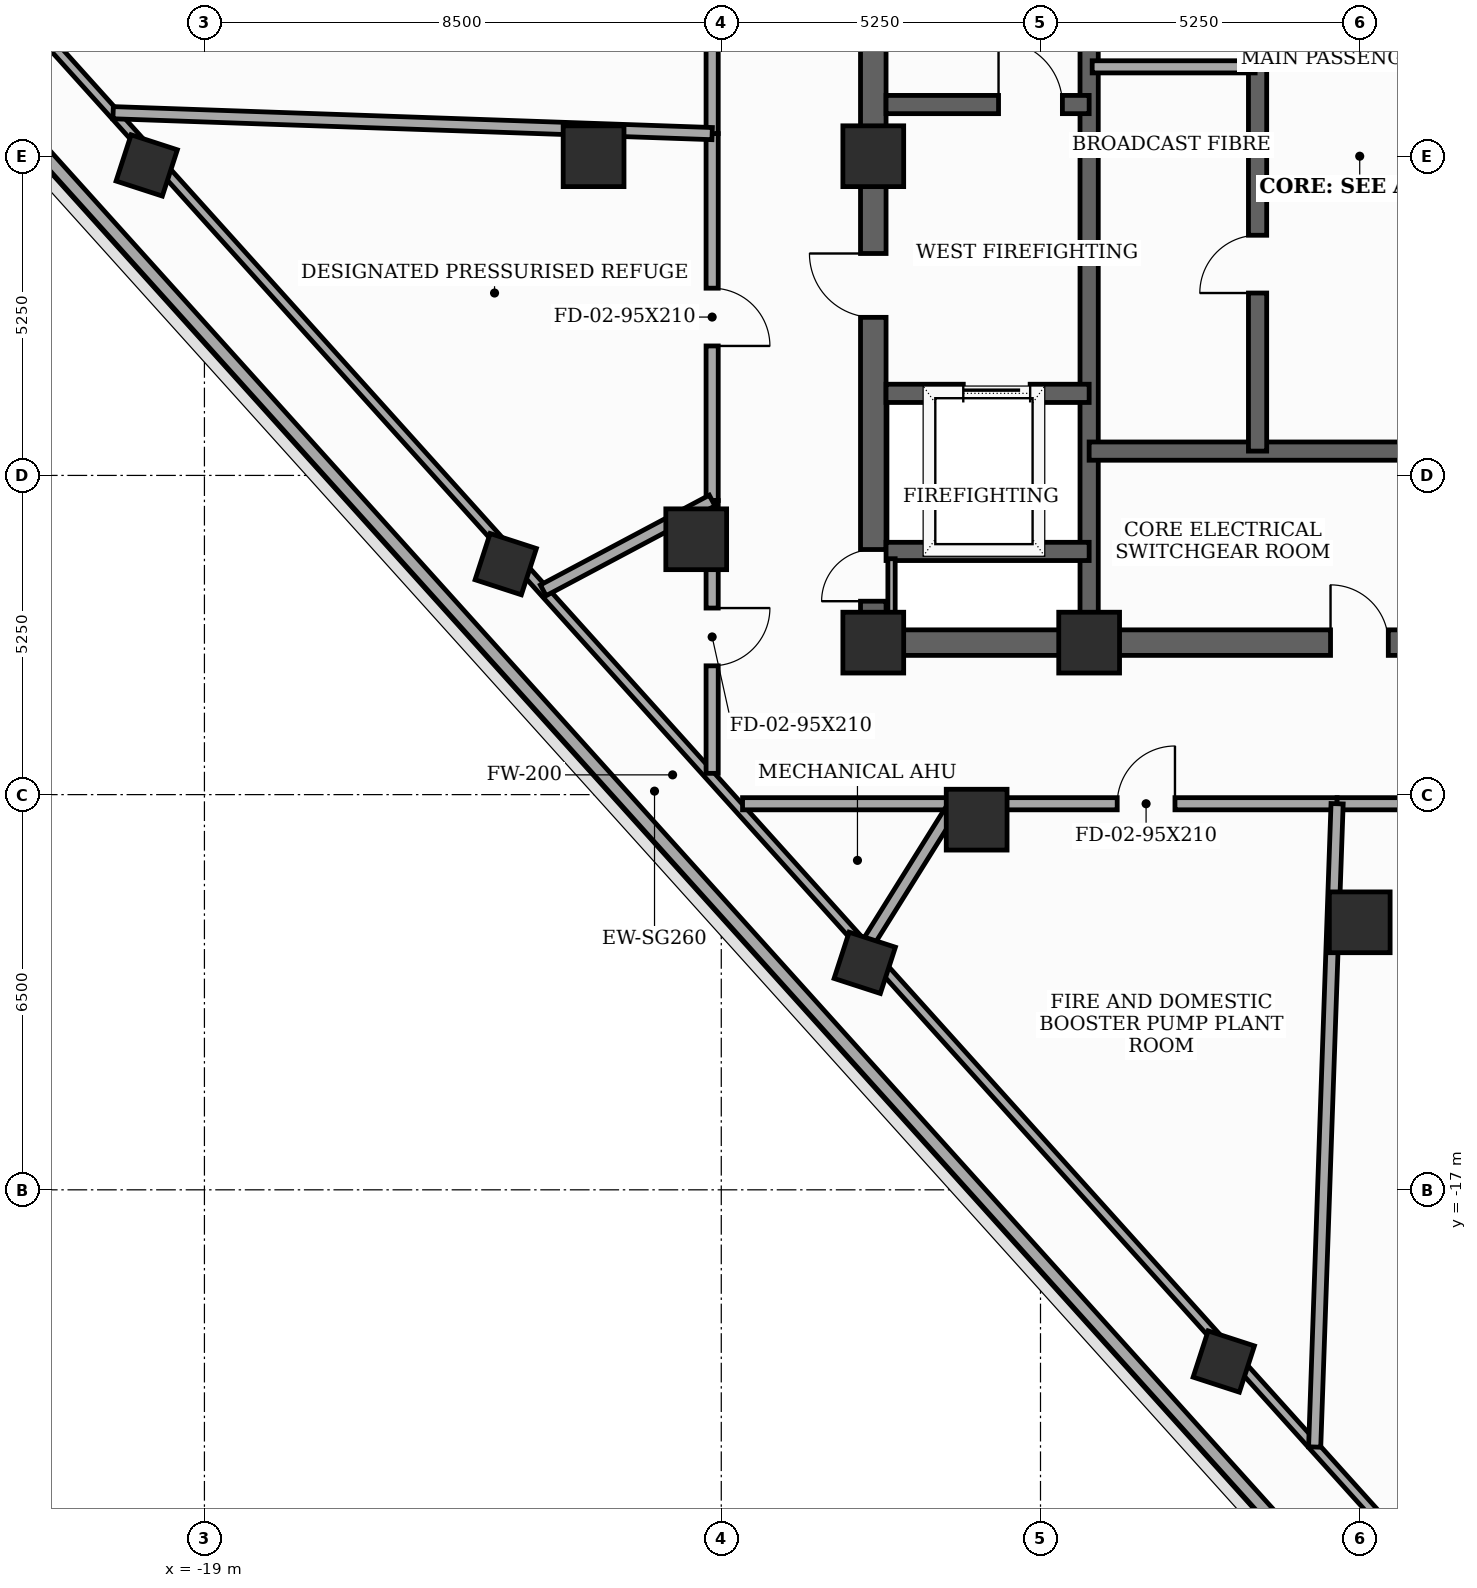
"""IFC4 building model, lengths in metres.
Left out: names, types, materials, properties, quantities, classifications, styles, units other than length and angle.
Written with IfcOpenShell. Run it as: python <this file> out.ifc"""

import sys

from ifc_helpers import new_model, si_unit, direction, frame, frame_2d, origin, origin_2d, place, context, subcontext, project, spatial, rectangle, extrude, element, fill, save


model = new_model("IFC4")
c1 = context("Model", 3, precision=1e-05, world=origin(), true_north=direction((0.0, 1.0)))
c2 = subcontext(c1, "Body", "Model", "MODEL_VIEW")
j1 = project(units=[si_unit("LENGTHUNIT", "METRE"), si_unit("PLANEANGLEUNIT", "RADIAN")], contexts=[c1])
p1 = place(None, origin())
s1 = spatial("IfcSite", under=j1, at=p1, CompositionType="ELEMENT")
p2 = place(p1, origin())
s2 = spatial("IfcBuilding", under=s1, at=p2, CompositionType="ELEMENT")
p3 = place(p2, frame((0.0, 0.0, 278.1)))
s3 = spatial("IfcBuildingStorey", under=s2, at=p3, CompositionType="ELEMENT", Elevation=278.1)
for number, where, z_axis, x_axis in (
    (1, (-8.0, -8.0, 0.0), (0.0, 0.0, 1.0), (1.0, 0.0, 0.0)),
    (2, (-4.45, -8.0, 0.0), (0.0, 0.0, 1.0), (1.0, 0.0, 0.0)),
    (3, (-8.0, 0.0, 0.0), (0.0, 0.0, 1.0), (1.0, 0.0, 0.0)),
    (4, (-12.6, 0.0, 0.0), (0.0, 0.0, 1.0), (1.0, 0.0, 0.0)),
    (5, (-10.912, -6.3, 0.0), (0.0, 0.0, 1.0), (1.0, 0.0, 0.0)),
    (6, (-6.3, -10.912, 0.0), (0.0, 0.0, 1.0), (1.0, 0.0, 0.0)),
    (7, (0.0, -12.6, 0.0), (0.0, 0.0, 1.0), (1.0, 0.0, 0.0)),
):
    element("IfcColumn", number, at=place(p3, frame(where, z_axis=z_axis, x_axis=x_axis)), inside=s3, PredefinedType="COLUMN", context=c2, shape_type="SweptSolid", body=[
        extrude(rectangle(XDim=1.0, YDim=1.0, at=origin_2d()), origin(), (0.0, 0.0, 1.0), 5.1),
    ])
for number, where, z_axis, x_axis in (
    (8, (-19.949, -0.151, 0.0), (0.0, 0.0, 1.0), (0.309, 0.951, 0.0)),
    (9, (-14.045, -6.709, 0.0), (0.0, 0.0, 1.0), (0.309, 0.951, 0.0)),
    (10, (-8.14, -13.266, 0.0), (0.0, 0.0, 1.0), (0.309, 0.951, 0.0)),
    (11, (-2.236, -19.824, 0.0), (0.0, 0.0, 1.0), (0.309, 0.951, 0.0)),
):
    element("IfcColumn", number, at=place(p3, frame(where, z_axis=z_axis, x_axis=x_axis)), inside=s3, PredefinedType="COLUMN", context=c2, shape_type="SweptSolid", body=[
        extrude(rectangle(XDim=0.8, YDim=0.8, at=origin_2d()), origin(), (0.0, 0.0, 1.0), 5.1),
    ])
p4 = place(p3, frame((-26.693, 5.65, 0.0), z_axis=(0.0, 0.0, 1.0), x_axis=(0.669131945078, -0.743143620087, 0.0)))
e12 = element("IfcWall", 12, at=p4, inside=s3, PredefinedType="SOLIDWALL", context=c2, shape_type="SweptSolid", body=[
    extrude(rectangle(XDim=44.12, YDim=0.22, at=frame_2d((22.06, 0.0))), origin(), (0.0, 0.0, 1.0), 4.4),
])
p5 = place(p3, frame((-8.0, -8.0, 0.0), z_axis=(0.0, 0.0, 1.0), x_axis=(0.0, 1.0, 0.0)))
e13 = element("IfcWall", 13, at=p5, inside=s3, PredefinedType="SHEAR", context=c2, shape_type="SweptSolid", body=[
    extrude(rectangle(XDim=16.0, YDim=0.42, at=frame_2d((8.0, 0.0))), origin(), (0.0, 0.0, 1.0), 4.9),
])
p6 = place(p5, frame((0.681, 0.0, 0.0)))
e14 = element("IfcOpeningElement", 14, at=p6, cuts=e13, PredefinedType="OPENING", context=c2, shape_type="SweptSolid", body=[
    extrude(rectangle(XDim=0.85, YDim=2.02, at=frame_2d((0.425, 1.01))), frame((0.0, 0.22, 0.0), z_axis=(0.0, -1.0, 0.0), x_axis=(1.0, 0.0, 0.0)), (0.0, 0.0, 1.0), 0.44),
])
p7 = place(p5, frame((5.35, 0.0, 0.0)))
e15 = element("IfcOpeningElement", 15, at=p7, cuts=e13, PredefinedType="OPENING", context=c2, shape_type="SweptSolid", body=[
    extrude(rectangle(XDim=1.05, YDim=2.15, at=frame_2d((0.525, 1.075))), frame((0.0, 0.22, 0.0), z_axis=(0.0, -1.0, 0.0), x_axis=(1.0, 0.0, 0.0)), (0.0, 0.0, 1.0), 0.44),
])
p8 = place(p3, frame((-8.0, -8.0, 0.0), z_axis=(0.0, 0.0, 1.0), x_axis=(1.0, 0.0, 0.0)))
e16 = element("IfcWall", 16, at=p8, inside=s3, PredefinedType="SHEAR", context=c2, shape_type="SweptSolid", body=[
    extrude(rectangle(XDim=16.0, YDim=0.42, at=frame_2d((8.0, 0.0))), origin(), (0.0, 0.0, 1.0), 4.9),
])
p9 = place(p8, frame((7.52, 0.0, 0.0)))
e17 = element("IfcOpeningElement", 17, at=p9, cuts=e16, PredefinedType="OPENING", context=c2, shape_type="SweptSolid", body=[
    extrude(rectangle(XDim=0.95, YDim=2.1, at=frame_2d((0.475, 1.05))), frame((0.0, 0.22, 0.0), z_axis=(0.0, -1.0, 0.0), x_axis=(1.0, 0.0, 0.0)), (0.0, 0.0, 1.0), 0.44),
])
p10 = place(p3, frame((-4.45, -7.79, 0.0), z_axis=(0.0, 0.0, 1.0), x_axis=(0.0, 1.0, 0.0)))
e18 = element("IfcWall", 18, at=p10, inside=s3, PredefinedType="SHEAR", context=c2, shape_type="SweptSolid", body=[
    extrude(rectangle(XDim=15.58, YDim=0.3, at=frame_2d((7.79, 0.0))), origin(), (0.0, 0.0, 1.0), 4.9),
])
p11 = place(p3, frame((-7.79, 0.85, 0.0), z_axis=(0.0, 0.0, 1.0), x_axis=(1.0, 0.0, 0.0)))
e19 = element("IfcWall", 19, at=p11, inside=s3, PredefinedType="SHEAR", context=c2, shape_type="SweptSolid", body=[
    extrude(rectangle(XDim=3.34, YDim=0.3, at=frame_2d((1.67, 0.0))), origin(), (0.0, 0.0, 1.0), 4.9),
])
p12 = place(p11, frame((1.85, 0.0, 0.0)))
e20 = element("IfcOpeningElement", 20, at=p12, cuts=e19, PredefinedType="OPENING", context=c2, shape_type="SweptSolid", body=[
    extrude(rectangle(XDim=1.05, YDim=2.15, at=frame_2d((0.525, 1.075))), frame((0.0, 0.16, 0.0), z_axis=(0.0, -1.0, 0.0), x_axis=(1.0, 0.0, 0.0)), (0.0, 0.0, 1.0), 0.32),
])
p13 = place(p3, frame((-7.79, -3.9, 0.0), z_axis=(0.0, 0.0, 1.0), x_axis=(1.0, 0.0, 0.0)))
e21 = element("IfcWall", 21, at=p13, inside=s3, PredefinedType="SHEAR", context=c2, shape_type="SweptSolid", body=[
    extrude(rectangle(XDim=3.34, YDim=0.3, at=frame_2d((1.67, 0.0))), origin(), (0.0, 0.0, 1.0), 4.9),
])
p14 = place(p13, frame((1.27, 0.0, 0.0)))
e22 = element("IfcOpeningElement", 22, at=p14, cuts=e21, PredefinedType="OPENING", context=c2, shape_type="SweptSolid", body=[
    extrude(rectangle(XDim=1.1, YDim=2.1, at=frame_2d((0.55, 1.05))), frame((0.0, 0.16, 0.0), z_axis=(0.0, -1.0, 0.0), x_axis=(1.0, 0.0, 0.0)), (0.0, 0.0, 1.0), 0.32),
])
p15 = place(p3, frame((-7.79, -6.5, 0.0), z_axis=(0.0, 0.0, 1.0), x_axis=(1.0, 0.0, 0.0)))
e23 = element("IfcWall", 23, at=p15, inside=s3, PredefinedType="SHEAR", context=c2, shape_type="SweptSolid", body=[
    extrude(rectangle(XDim=3.34, YDim=0.3, at=frame_2d((1.67, 0.0))), origin(), (0.0, 0.0, 1.0), 4.9),
])
p16 = place(p3, frame((-4.45, -4.85, 0.0), z_axis=(0.0, 0.0, 1.0), x_axis=(1.0, 0.0, 0.0)))
e24 = element("IfcWall", 24, at=p16, inside=s3, PredefinedType="SHEAR", context=c2, shape_type="SweptSolid", body=[
    extrude(rectangle(XDim=8.9, YDim=0.3, at=frame_2d((4.45, 0.0))), origin(), (0.0, 0.0, 1.0), 4.9),
])
p17 = place(p3, frame((-1.68, -4.85, 0.0), z_axis=(0.0, 0.0, 1.0), x_axis=(0.0, 1.0, 0.0)))
e25 = element("IfcWall", 25, at=p17, inside=s3, PredefinedType="SHEAR", context=c2, shape_type="SweptSolid", body=[
    extrude(rectangle(XDim=12.64, YDim=0.3, at=frame_2d((6.32, 0.0))), origin(), (0.0, 0.0, 1.0), 4.9),
])
p18 = place(p17, frame((2.6, 0.0, 0.0)))
e26 = element("IfcOpeningElement", 26, at=p18, cuts=e25, PredefinedType="OPENING", context=c2, shape_type="SweptSolid", body=[
    extrude(rectangle(XDim=0.95, YDim=2.1, at=frame_2d((0.475, 1.05))), frame((0.0, 0.16, 0.0), z_axis=(0.0, -1.0, 0.0), x_axis=(1.0, 0.0, 0.0)), (0.0, 0.0, 1.0), 0.32),
])
p19 = place(p17, frame((8.8, 0.0, 0.0)))
e27 = element("IfcOpeningElement", 27, at=p19, cuts=e25, PredefinedType="OPENING", context=c2, shape_type="SweptSolid", body=[
    extrude(rectangle(XDim=0.95, YDim=2.1, at=frame_2d((0.475, 1.05))), frame((0.0, 0.16, 0.0), z_axis=(0.0, -1.0, 0.0), x_axis=(1.0, 0.0, 0.0)), (0.0, 0.0, 1.0), 0.32),
])
p20 = place(p3, frame((-4.4, 1.47, 0.0), z_axis=(0.0, 0.0, 1.0), x_axis=(1.0, 0.0, 0.0)))
e28 = element("IfcWall", 28, at=p20, inside=s3, PredefinedType="SOLIDWALL", context=c2, shape_type="SweptSolid", body=[
    extrude(rectangle(XDim=2.68, YDim=0.2, at=frame_2d((1.34, 0.0))), origin(), (0.0, 0.0, 1.0), 4.9),
])
p21 = place(p3, frame((3.67, -26.129, 0.0), z_axis=(0.0, 0.0, 1.0), x_axis=(-0.669133990093, 0.743141778735, 0.0)))
e29 = element("IfcWall", 29, at=p21, inside=s3, PredefinedType="SOLIDWALL", context=c2, shape_type="SweptSolid", body=[
    extrude(rectangle(XDim=43.746, YDim=0.16, at=frame_2d((21.873, 0.0))), origin(), (0.0, 0.0, 1.0), 3.485),
])
p22 = place(p3, frame((-10.65, 0.372, 0.0), z_axis=(0.0, 0.0, 1.0), x_axis=(0.0, -1.0, 0.0)))
e30 = element("IfcWall", 30, at=p22, inside=s3, PredefinedType="SOLIDWALL", context=c2, shape_type="SweptSolid", body=[
    extrude(rectangle(XDim=6.035, YDim=0.2, at=frame_2d((3.018, 0.0))), origin(), (0.0, 0.0, 1.0), 4.285),
])
p23 = place(p22, frame((2.542, 0.0, 0.0)))
e31 = element("IfcOpeningElement", 31, at=p23, cuts=e30, PredefinedType="OPENING", context=c2, shape_type="SweptSolid", body=[
    extrude(rectangle(XDim=0.95, YDim=2.1, at=frame_2d((0.475, 1.05))), frame((0.0, 0.11, 0.0), z_axis=(0.0, -1.0, 0.0), x_axis=(1.0, 0.0, 0.0)), (0.0, 0.0, 1.0), 0.22),
])
p24 = place(p3, frame((-10.65, -5.663, 0.0), z_axis=(0.0, 0.0, 1.0), x_axis=(0.0, -1.0, 0.0)))
e32 = element("IfcWall", 32, at=p24, inside=s3, PredefinedType="SOLIDWALL", context=c2, shape_type="SweptSolid", body=[
    extrude(rectangle(XDim=4.487, YDim=0.2, at=frame_2d((2.243, 0.0))), origin(), (0.0, 0.0, 1.0), 3.485),
])
p25 = place(p24, frame((1.769, 0.0, 0.0)))
e33 = element("IfcOpeningElement", 33, at=p25, cuts=e32, PredefinedType="OPENING", context=c2, shape_type="SweptSolid", body=[
    extrude(rectangle(XDim=0.95, YDim=2.1, at=frame_2d((0.475, 1.05))), frame((0.0, 0.11, 0.0), z_axis=(0.0, -1.0, 0.0), x_axis=(1.0, 0.0, 0.0)), (0.0, 0.0, 1.0), 0.22),
])
p26 = place(p3, frame((-10.15, -10.65, 0.0), z_axis=(0.0, 0.0, 1.0), x_axis=(1.0, 0.0, 0.0)))
e34 = element("IfcWall", 34, at=p26, inside=s3, PredefinedType="SOLIDWALL", context=c2, shape_type="SweptSolid", body=[
    extrude(rectangle(XDim=3.495, YDim=0.2, at=frame_2d((1.748, 0.0))), origin(), (0.0, 0.0, 1.0), 3.485),
])
p27 = place(p3, frame((-6.655, -10.65, 0.0), z_axis=(0.0, 0.0, 1.0), x_axis=(1.0, 0.0, 0.0)))
e35 = element("IfcWall", 35, at=p27, inside=s3, PredefinedType="SOLIDWALL", context=c2, shape_type="SweptSolid", body=[
    extrude(rectangle(XDim=6.283, YDim=0.2, at=frame_2d((3.142, 0.0))), origin(), (0.0, 0.0, 1.0), 3.485),
])
p28 = place(p27, frame((2.667, 0.0, 0.0)))
e36 = element("IfcOpeningElement", 36, at=p28, cuts=e35, PredefinedType="OPENING", context=c2, shape_type="SweptSolid", body=[
    extrude(rectangle(XDim=0.95, YDim=2.1, at=frame_2d((0.475, 1.05))), frame((0.0, 0.11, 0.0), z_axis=(0.0, -1.0, 0.0), x_axis=(1.0, 0.0, 0.0)), (0.0, 0.0, 1.0), 0.22),
])
p29 = place(p3, frame((-0.372, -10.65, 0.0), z_axis=(0.0, 0.0, 1.0), x_axis=(1.0, 0.0, 0.0)))
e37 = element("IfcWall", 37, at=p29, inside=s3, PredefinedType="SOLIDWALL", context=c2, shape_type="SweptSolid", body=[
    extrude(rectangle(XDim=6.035, YDim=0.2, at=frame_2d((3.018, 0.0))), origin(), (0.0, 0.0, 1.0), 4.9),
])
p30 = place(p29, frame((2.542, 0.0, 0.0)))
e38 = element("IfcOpeningElement", 38, at=p30, cuts=e37, PredefinedType="OPENING", context=c2, shape_type="SweptSolid", body=[
    extrude(rectangle(XDim=0.95, YDim=2.1, at=frame_2d((0.475, 1.05))), frame((0.0, 0.11, 0.0), z_axis=(0.0, -1.0, 0.0), x_axis=(1.0, 0.0, 0.0)), (0.0, 0.0, 1.0), 0.22),
])
p31 = place(p3, frame((-10.65, 6.655, 0.0), z_axis=(0.0, 0.0, 1.0), x_axis=(0.0, -1.0, 0.0)))
e39 = element("IfcWall", 39, at=p31, inside=s3, PredefinedType="SOLIDWALL", context=c2, shape_type="SweptSolid", body=[
    extrude(rectangle(XDim=6.283, YDim=0.2, at=frame_2d((3.142, 0.0))), origin(), (0.0, 0.0, 1.0), 3.485),
])
p32 = place(p31, frame((2.667, 0.0, 0.0)))
e40 = element("IfcOpeningElement", 40, at=p32, cuts=e39, PredefinedType="OPENING", context=c2, shape_type="SweptSolid", body=[
    extrude(rectangle(XDim=0.95, YDim=2.1, at=frame_2d((0.475, 1.05))), frame((0.0, 0.11, 0.0), z_axis=(0.0, -1.0, 0.0), x_axis=(1.0, 0.0, 0.0)), (0.0, 0.0, 1.0), 0.22),
])
p33 = place(p3, frame((-13.428, -7.14, 0.0), z_axis=(0.0, 0.0, 1.0), x_axis=(0.882990100453, 0.469391608897, 0.0)))
e41 = element("IfcWall", 41, at=p33, inside=s3, PredefinedType="SOLIDWALL", context=c2, shape_type="SweptSolid", body=[
    extrude(rectangle(XDim=3.146, YDim=0.2, at=frame_2d((1.573, 0.0))), origin(), (0.0, 0.0, 1.0), 3.485),
])
p34 = place(p3, frame((-10.65, 0.372, 0.0), z_axis=(0.0, 0.0, 1.0), x_axis=(-0.999390903009, 0.03489732057, 0.0)))
e42 = element("IfcWall", 42, at=p34, inside=s3, PredefinedType="SOLIDWALL", context=c2, shape_type="SweptSolid", body=[
    extrude(rectangle(XDim=9.857, YDim=0.2, at=frame_2d((4.929, 0.0))), origin(), (0.0, 0.0, 1.0), 3.485),
])
p35 = place(p3, frame((-8.135, -13.018, 0.0), z_axis=(0.0, 0.0, 1.0), x_axis=(0.5299675061, 0.848017949384, 0.0)))
e43 = element("IfcWall", 43, at=p35, inside=s3, PredefinedType="SOLIDWALL", context=c2, shape_type="SweptSolid", body=[
    extrude(rectangle(XDim=2.792, YDim=0.2, at=frame_2d((1.396, 0.0))), origin(), (0.0, 0.0, 1.0), 3.485),
])
p36 = place(p3, frame((-0.741, -21.23, 0.0), z_axis=(0.0, 0.0, 1.0), x_axis=(0.034845910212, 0.999392696862, 0.0)))
e44 = element("IfcWall", 44, at=p36, inside=s3, PredefinedType="SOLIDWALL", context=c2, shape_type="SweptSolid", body=[
    extrude(rectangle(XDim=10.586, YDim=0.2, at=frame_2d((5.293, 0.0))), origin(), (0.0, 0.0, 1.0), 3.485),
])
p37 = place(p3, frame((-7.7, -7.75, 0.0), z_axis=(0.0, 0.0, 1.0), x_axis=(0.0, 1.0, 0.0)))
e45 = element("IfcWall", 45, at=p37, inside=s3, PredefinedType="PLUMBINGWALL", context=c2, shape_type="SweptSolid", body=[
    extrude(rectangle(XDim=1.13, YDim=0.12, at=frame_2d((0.565, 0.0))), origin(), (0.0, 0.0, 1.0), 4.9),
])
p38 = place(p6, origin())
e46 = element("IfcDoor", 46, at=p38, inside=s3, OperationType="SINGLE_SWING_LEFT", PredefinedType="TRAPDOOR", context=c2, shape_type="SweptSolid", body=[
    extrude(rectangle(XDim=0.85, YDim=2.02, at=frame_2d((0.425, 1.01))), frame((0.0, 0.025, 0.0), z_axis=(0.0, -1.0, 0.0), x_axis=(1.0, 0.0, 0.0)), (0.0, 0.0, 1.0), 0.05),
])
fill(e14, e46)
p39 = place(p7, origin())
e47 = element("IfcDoor", 47, at=p39, inside=s3, OperationType="SINGLE_SWING_RIGHT", PredefinedType="DOOR", context=c2, shape_type="SweptSolid", body=[
    extrude(rectangle(XDim=1.05, YDim=2.15, at=frame_2d((0.525, 1.075))), frame((0.0, 0.025, 0.0), z_axis=(0.0, -1.0, 0.0), x_axis=(1.0, 0.0, 0.0)), (0.0, 0.0, 1.0), 0.05),
])
fill(e15, e47)
p40 = place(p9, origin())
e48 = element("IfcDoor", 48, at=p40, inside=s3, OperationType="SINGLE_SWING_LEFT", PredefinedType="DOOR", context=c2, shape_type="SweptSolid", body=[
    extrude(rectangle(XDim=0.95, YDim=2.1, at=frame_2d((0.475, 1.05))), frame((0.0, 0.025, 0.0), z_axis=(0.0, -1.0, 0.0), x_axis=(1.0, 0.0, 0.0)), (0.0, 0.0, 1.0), 0.05),
])
fill(e17, e48)
p41 = place(p12, origin())
e49 = element("IfcDoor", 49, at=p41, inside=s3, OperationType="SINGLE_SWING_LEFT", PredefinedType="DOOR", context=c2, shape_type="SweptSolid", body=[
    extrude(rectangle(XDim=1.05, YDim=2.15, at=frame_2d((0.525, 1.075))), frame((0.0, 0.025, 0.0), z_axis=(0.0, -1.0, 0.0), x_axis=(1.0, 0.0, 0.0)), (0.0, 0.0, 1.0), 0.05),
])
fill(e20, e49)
p42 = place(p14, origin())
e50 = element("IfcDoor", 50, at=p42, inside=s3, OperationType="SLIDING_TO_LEFT", PredefinedType="DOOR", context=c2, shape_type="SweptSolid", body=[
    extrude(rectangle(XDim=1.1, YDim=2.1, at=frame_2d((0.55, 1.05))), frame((0.0, 0.025, 0.0), z_axis=(0.0, -1.0, 0.0), x_axis=(1.0, 0.0, 0.0)), (0.0, 0.0, 1.0), 0.05),
])
fill(e22, e50)
p43 = place(p18, origin())
e51 = element("IfcDoor", 51, at=p43, inside=s3, OperationType="SINGLE_SWING_LEFT", PredefinedType="DOOR", context=c2, shape_type="SweptSolid", body=[
    extrude(rectangle(XDim=0.95, YDim=2.1, at=frame_2d((0.475, 1.05))), frame((0.0, 0.025, 0.0), z_axis=(0.0, -1.0, 0.0), x_axis=(1.0, 0.0, 0.0)), (0.0, 0.0, 1.0), 0.05),
])
fill(e26, e51)
p44 = place(p23, origin())
e52 = element("IfcDoor", 52, at=p44, inside=s3, OperationType="SINGLE_SWING_RIGHT", PredefinedType="DOOR", context=c2, shape_type="SweptSolid", body=[
    extrude(rectangle(XDim=0.95, YDim=2.1, at=frame_2d((0.475, 1.05))), frame((0.0, 0.025, 0.0), z_axis=(0.0, -1.0, 0.0), x_axis=(1.0, 0.0, 0.0)), (0.0, 0.0, 1.0), 0.05),
])
fill(e31, e52)
p45 = place(p25, origin())
e53 = element("IfcDoor", 53, at=p45, inside=s3, OperationType="SINGLE_SWING_LEFT", PredefinedType="DOOR", context=c2, shape_type="SweptSolid", body=[
    extrude(rectangle(XDim=0.95, YDim=2.1, at=frame_2d((0.475, 1.05))), frame((0.0, 0.025, 0.0), z_axis=(0.0, -1.0, 0.0), x_axis=(1.0, 0.0, 0.0)), (0.0, 0.0, 1.0), 0.05),
])
fill(e33, e53)
p46 = place(p28, origin())
e54 = element("IfcDoor", 54, at=p46, inside=s3, OperationType="SINGLE_SWING_RIGHT", PredefinedType="DOOR", context=c2, shape_type="SweptSolid", body=[
    extrude(rectangle(XDim=0.95, YDim=2.1, at=frame_2d((0.475, 1.05))), frame((0.0, 0.025, 0.0), z_axis=(0.0, -1.0, 0.0), x_axis=(1.0, 0.0, 0.0)), (0.0, 0.0, 1.0), 0.05),
])
fill(e36, e54)
save(model, sys.argv[1])
